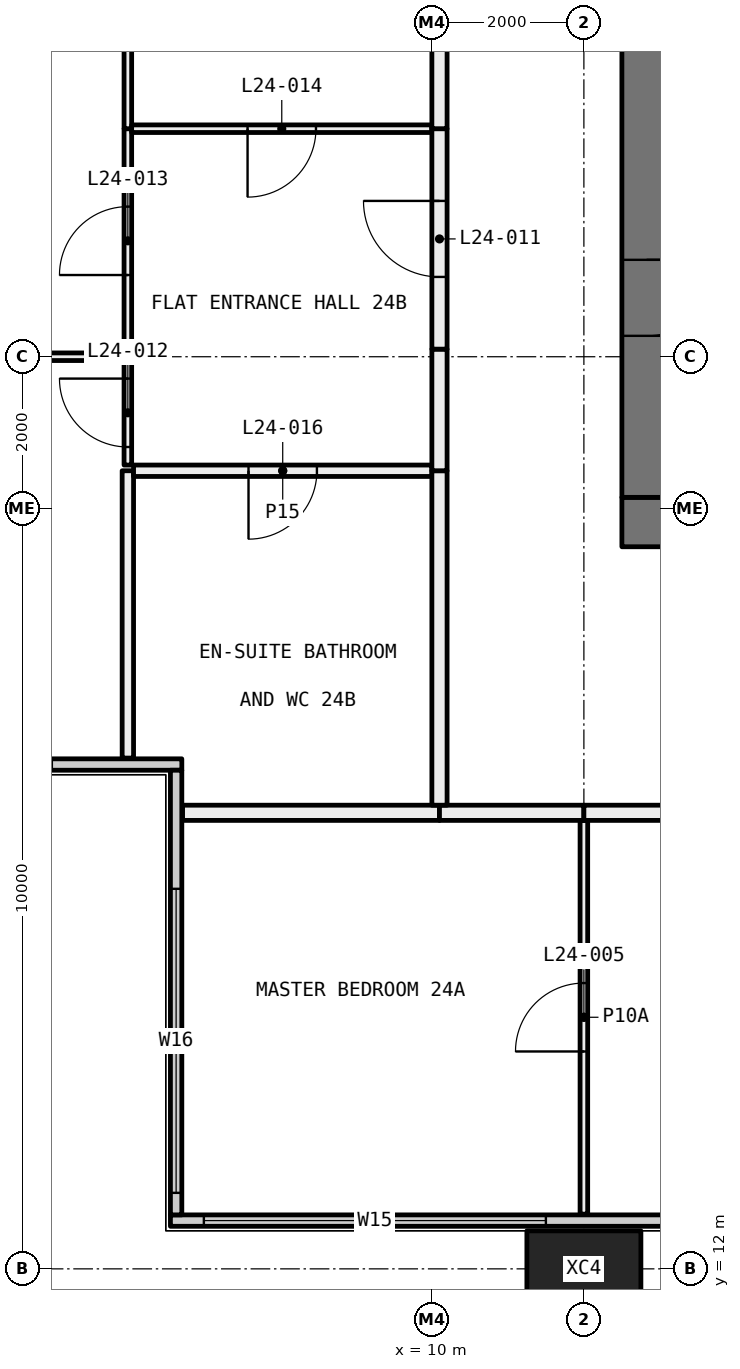
"""IFC4 building model, lengths in metres.
Left out: names, types, materials, properties, quantities, classifications, styles, units other than length and angle.
Written with IfcOpenShell. Run it as: python <this file> out.ifc"""

import sys

from ifc_helpers import new_model, si_unit, direction, frame, frame_2d, origin, origin_2d, place, context, subcontext, project, spatial, rectangle, hollow_rectangle, extrude, element, fill, save


model = new_model("IFC4")
c1 = context("Model", 3, precision=1e-05, world=origin(), true_north=direction((0.0, 1.0)))
c2 = subcontext(c1, "Body", "Model", "MODEL_VIEW")
j1 = project(units=[si_unit("LENGTHUNIT", "METRE"), si_unit("PLANEANGLEUNIT", "RADIAN")], contexts=[c1])
p1 = place(None, origin())
s1 = spatial("IfcSite", under=j1, at=p1, CompositionType="ELEMENT")
p2 = place(p1, origin())
s2 = spatial("IfcBuilding", under=s1, at=p2, CompositionType="ELEMENT")
p3 = place(p2, frame((0.0, 0.0, 96.6)))
s3 = spatial("IfcBuildingStorey", under=s2, at=p3, CompositionType="ELEMENT", Elevation=96.6)
p4 = place(p3, frame((12.0, 12.0, -0.4), z_axis=(0.0, 0.0, 1.0), x_axis=(1.0, 0.0, 0.0)))
e1 = element("IfcColumn", 1, at=p4, inside=s3, PredefinedType="COLUMN", context=c2, shape_type="SweptSolid", body=[
    extrude(hollow_rectangle(XDim=1.5, YDim=1.0, WallThickness=0.06, at=origin_2d()), origin(), (0.0, 0.0, 1.0), 3.45),
])
p5 = place(p3, frame((6.56, 12.635, 0.0), z_axis=(0.0, 0.0, 1.0), x_axis=(1.0, 0.0, 0.0)))
e2 = element("IfcWall", 2, at=p5, inside=s3, PredefinedType="ELEMENTEDWALL", context=c2, shape_type="SweptSolid", body=[
    extrude(rectangle(XDim=58.88, YDim=0.15, at=frame_2d((29.44, 0.0))), origin(), (0.0, 0.0, 1.0), 3.05),
])
p6 = place(p5, frame((0.44, 0.0, 0.45)))
e3 = element("IfcOpeningElement", 3, at=p6, cuts=e2, PredefinedType="OPENING", context=c2, shape_type="SweptSolid", body=[
    extrude(rectangle(XDim=4.5, YDim=2.55, at=frame_2d((2.25, 1.275))), frame((0.0, 0.085, 0.0), z_axis=(0.0, -1.0, 0.0), x_axis=(1.0, 0.0, 0.0)), (0.0, 0.0, 1.0), 0.17),
])
p7 = place(p5, frame((8.19, 0.0, 0.45)))
e4 = element("IfcOpeningElement", 4, at=p7, cuts=e2, PredefinedType="OPENING", context=c2, shape_type="SweptSolid", body=[
    extrude(rectangle(XDim=2.75, YDim=2.55, at=frame_2d((1.375, 1.275))), frame((0.0, 0.085, 0.0), z_axis=(0.0, -1.0, 0.0), x_axis=(1.0, 0.0, 0.0)), (0.0, 0.0, 1.0), 0.17),
])
p8 = place(p5, frame((11.94, 0.0, 0.45)))
e5 = element("IfcOpeningElement", 5, at=p8, cuts=e2, PredefinedType="OPENING", context=c2, shape_type="SweptSolid", body=[
    extrude(rectangle(XDim=2.75, YDim=2.55, at=frame_2d((1.375, 1.275))), frame((0.0, 0.085, 0.0), z_axis=(0.0, -1.0, 0.0), x_axis=(1.0, 0.0, 0.0)), (0.0, 0.0, 1.0), 0.17),
])
p9 = place(p5, frame((20.19, 0.0, 0.45)))
e6 = element("IfcOpeningElement", 6, at=p9, cuts=e2, PredefinedType="OPENING", context=c2, shape_type="SweptSolid", body=[
    extrude(rectangle(XDim=2.75, YDim=2.55, at=frame_2d((1.375, 1.275))), frame((0.0, 0.085, 0.0), z_axis=(0.0, -1.0, 0.0), x_axis=(1.0, 0.0, 0.0)), (0.0, 0.0, 1.0), 0.17),
])
p10 = place(p5, frame((23.94, 0.0, 0.45)))
e7 = element("IfcOpeningElement", 7, at=p10, cuts=e2, PredefinedType="OPENING", context=c2, shape_type="SweptSolid", body=[
    extrude(rectangle(XDim=2.0, YDim=2.55, at=frame_2d((1.0, 1.275))), frame((0.0, 0.085, 0.0), z_axis=(0.0, -1.0, 0.0), x_axis=(1.0, 0.0, 0.0)), (0.0, 0.0, 1.0), 0.17),
])
p11 = place(p5, frame((32.19, 0.0, 0.45)))
e8 = element("IfcOpeningElement", 8, at=p11, cuts=e2, PredefinedType="OPENING", context=c2, shape_type="SweptSolid", body=[
    extrude(rectangle(XDim=2.75, YDim=2.55, at=frame_2d((1.375, 1.275))), frame((0.0, 0.085, 0.0), z_axis=(0.0, -1.0, 0.0), x_axis=(1.0, 0.0, 0.0)), (0.0, 0.0, 1.0), 0.17),
])
p12 = place(p5, frame((35.94, 0.0, 0.45)))
e9 = element("IfcOpeningElement", 9, at=p12, cuts=e2, PredefinedType="OPENING", context=c2, shape_type="SweptSolid", body=[
    extrude(rectangle(XDim=2.75, YDim=2.55, at=frame_2d((1.375, 1.275))), frame((0.0, 0.085, 0.0), z_axis=(0.0, -1.0, 0.0), x_axis=(1.0, 0.0, 0.0)), (0.0, 0.0, 1.0), 0.17),
])
p13 = place(p5, frame((44.19, 0.0, 0.45)))
e10 = element("IfcOpeningElement", 10, at=p13, cuts=e2, PredefinedType="OPENING", context=c2, shape_type="SweptSolid", body=[
    extrude(rectangle(XDim=2.75, YDim=2.55, at=frame_2d((1.375, 1.275))), frame((0.0, 0.085, 0.0), z_axis=(0.0, -1.0, 0.0), x_axis=(1.0, 0.0, 0.0)), (0.0, 0.0, 1.0), 0.17),
])
p14 = place(p5, frame((47.94, 0.0, 0.45)))
e11 = element("IfcOpeningElement", 11, at=p14, cuts=e2, PredefinedType="OPENING", context=c2, shape_type="SweptSolid", body=[
    extrude(rectangle(XDim=2.0, YDim=2.55, at=frame_2d((1.0, 1.275))), frame((0.0, 0.085, 0.0), z_axis=(0.0, -1.0, 0.0), x_axis=(1.0, 0.0, 0.0)), (0.0, 0.0, 1.0), 0.17),
])
p15 = place(p5, frame((53.94, 0.0, 0.45)))
e12 = element("IfcOpeningElement", 12, at=p15, cuts=e2, PredefinedType="OPENING", context=c2, shape_type="SweptSolid", body=[
    extrude(rectangle(XDim=4.5, YDim=2.55, at=frame_2d((2.25, 1.275))), frame((0.0, 0.085, 0.0), z_axis=(0.0, -1.0, 0.0), x_axis=(1.0, 0.0, 0.0)), (0.0, 0.0, 1.0), 0.17),
])
p16 = place(p3, frame((0.56, 18.635, 0.0), z_axis=(0.0, 0.0, 1.0), x_axis=(1.0, 0.0, 0.0)))
e13 = element("IfcWall", 13, at=p16, inside=s3, PredefinedType="ELEMENTEDWALL", context=c2, shape_type="SweptSolid", body=[
    extrude(rectangle(XDim=6.15, YDim=0.15, at=frame_2d((3.075, 0.0))), origin(), (0.0, 0.0, 1.0), 3.05),
])
p17 = place(p16, frame((0.44, 0.0, 0.45)))
e14 = element("IfcOpeningElement", 14, at=p17, cuts=e13, PredefinedType="OPENING", context=c2, shape_type="SweptSolid", body=[
    extrude(rectangle(XDim=4.0, YDim=2.55, at=frame_2d((2.0, 1.275))), frame((0.0, 0.085, 0.0), z_axis=(0.0, -1.0, 0.0), x_axis=(1.0, 0.0, 0.0)), (0.0, 0.0, 1.0), 0.17),
])
p18 = place(p3, frame((6.635, 12.71, 0.0), z_axis=(0.0, 0.0, 1.0), x_axis=(0.0, 1.0, 0.0)))
e15 = element("IfcWall", 15, at=p18, inside=s3, PredefinedType="ELEMENTEDWALL", context=c2, shape_type="SweptSolid", body=[
    extrude(rectangle(XDim=5.85, YDim=0.15, at=frame_2d((2.925, 0.0))), origin(), (0.0, 0.0, 1.0), 3.05),
])
p19 = place(p18, frame((0.29, 0.0, 0.45)))
e16 = element("IfcOpeningElement", 16, at=p19, cuts=e15, PredefinedType="OPENING", context=c2, shape_type="SweptSolid", body=[
    extrude(rectangle(XDim=4.0, YDim=2.55, at=frame_2d((2.0, 1.275))), frame((0.0, 0.085, 0.0), z_axis=(0.0, -1.0, 0.0), x_axis=(1.0, 0.0, 0.0)), (0.0, 0.0, 1.0), 0.17),
])
p20 = place(p3, frame((12.0, 12.72, 0.0), z_axis=(0.0, 0.0, 1.0), x_axis=(0.0, 1.0, 0.0)))
e17 = element("IfcWall", 17, at=p20, inside=s3, PredefinedType="PARTITIONING", context=c2, shape_type="SweptSolid", body=[
    extrude(rectangle(XDim=5.18, YDim=0.1, at=frame_2d((2.59, 0.0))), origin(), (0.0, 0.0, 1.0), 3.05),
])
p21 = place(p20, frame((2.14, 0.0, 0.0)))
e18 = element("IfcOpeningElement", 18, at=p21, cuts=e17, PredefinedType="OPENING", context=c2, shape_type="SweptSolid", body=[
    extrude(rectangle(XDim=0.9, YDim=2.1, at=frame_2d((0.45, 1.05))), frame((0.0, 0.06, 0.0), z_axis=(0.0, -1.0, 0.0), x_axis=(1.0, 0.0, 0.0)), (0.0, 0.0, 1.0), 0.12),
])
p22 = place(p3, frame((10.1, 18.0, 0.0), z_axis=(0.0, 0.0, 1.0), x_axis=(-1.0, 0.0, 0.0)))
e19 = element("IfcWall", 19, at=p22, inside=s3, PredefinedType="PARTITIONING", context=c2, shape_type="SweptSolid", body=[
    extrude(rectangle(XDim=3.38, YDim=0.2, at=frame_2d((1.69, 0.0))), origin(), (0.0, 0.0, 1.0), 3.05),
])
p23 = place(p3, frame((12.0, 18.0, 0.0), z_axis=(0.0, 0.0, 1.0), x_axis=(-1.0, 0.0, 0.0)))
e20 = element("IfcWall", 20, at=p23, inside=s3, PredefinedType="PARTITIONING", context=c2, shape_type="SweptSolid", body=[
    extrude(rectangle(XDim=1.9, YDim=0.2, at=frame_2d((0.95, 0.0))), origin(), (0.0, 0.0, 1.0), 3.05),
])
p24 = place(p3, frame((18.0, 18.0, 0.0), z_axis=(0.0, 0.0, 1.0), x_axis=(-1.0, 0.0, 0.0)))
e21 = element("IfcWall", 21, at=p24, inside=s3, PredefinedType="PARTITIONING", context=c2, shape_type="SweptSolid", body=[
    extrude(rectangle(XDim=6.0, YDim=0.2, at=frame_2d((3.0, 0.0))), origin(), (0.0, 0.0, 1.0), 3.05),
])
p25 = place(p24, frame((2.5, 0.0, 0.0)))
e22 = element("IfcOpeningElement", 22, at=p25, cuts=e21, PredefinedType="OPENING", context=c2, shape_type="SweptSolid", body=[
    extrude(rectangle(XDim=1.0, YDim=2.1, at=frame_2d((0.5, 1.05))), frame((0.0, 0.11, 0.0), z_axis=(0.0, -1.0, 0.0), x_axis=(1.0, 0.0, 0.0)), (0.0, 0.0, 1.0), 0.22),
])
p26 = place(p3, frame((6.0, 24.0, 0.0), z_axis=(0.0, 0.0, 1.0), x_axis=(-1.0, 0.0, 0.0)))
e23 = element("IfcWall", 23, at=p26, inside=s3, PredefinedType="PARTITIONING", context=c2, shape_type="SweptSolid", body=[
    extrude(rectangle(XDim=5.28, YDim=0.1, at=frame_2d((2.64, 0.0))), origin(), (0.0, 0.0, 1.0), 2.45),
])
p27 = place(p3, frame((6.0, 18.72, 0.0), z_axis=(0.0, 0.0, 1.0), x_axis=(0.0, 1.0, 0.0)))
e24 = element("IfcWall", 24, at=p27, inside=s3, PredefinedType="PARTITIONING", context=c2, shape_type="SweptSolid", body=[
    extrude(rectangle(XDim=3.78, YDim=0.15, at=frame_2d((1.89, 0.0))), origin(), (0.0, 0.0, 1.0), 3.05),
])
p28 = place(p3, frame((6.0, 22.575, 0.0), z_axis=(0.0, 0.0, 1.0), x_axis=(0.0, 1.0, 0.0)))
e25 = element("IfcWall", 25, at=p28, inside=s3, PredefinedType="PARTITIONING", context=c2, shape_type="SweptSolid", body=[
    extrude(rectangle(XDim=1.375, YDim=0.1, at=frame_2d((0.688, 0.0))), origin(), (0.0, 0.0, 1.0), 2.45),
])
p29 = place(p28, frame((0.238, 0.0, 0.0)))
e26 = element("IfcOpeningElement", 26, at=p29, cuts=e25, PredefinedType="OPENING", context=c2, shape_type="SweptSolid", body=[
    extrude(rectangle(XDim=0.9, YDim=2.1, at=frame_2d((0.45, 1.05))), frame((0.0, 0.06, 0.0), z_axis=(0.0, -1.0, 0.0), x_axis=(1.0, 0.0, 0.0)), (0.0, 0.0, 1.0), 0.12),
])
p30 = place(p3, frame((6.0, 24.05, 0.0), z_axis=(0.0, 0.0, 1.0), x_axis=(0.0, 1.0, 0.0)))
e27 = element("IfcWall", 27, at=p30, inside=s3, PredefinedType="PARTITIONING", context=c2, shape_type="SweptSolid", body=[
    extrude(rectangle(XDim=2.95, YDim=0.1, at=frame_2d((1.475, 0.0))), origin(), (0.0, 0.0, 1.0), 2.45),
])
p31 = place(p30, frame((1.025, 0.0, 0.0)))
e28 = element("IfcOpeningElement", 28, at=p31, cuts=e27, PredefinedType="OPENING", context=c2, shape_type="SweptSolid", body=[
    extrude(rectangle(XDim=0.9, YDim=2.1, at=frame_2d((0.45, 1.05))), frame((0.0, 0.06, 0.0), z_axis=(0.0, -1.0, 0.0), x_axis=(1.0, 0.0, 0.0)), (0.0, 0.0, 1.0), 0.12),
])
p32 = place(p3, frame((6.0, 27.0, 0.0), z_axis=(0.0, 0.0, 1.0), x_axis=(0.0, 1.0, 0.0)))
e29 = element("IfcWall", 29, at=p32, inside=s3, PredefinedType="PARTITIONING", context=c2, shape_type="SweptSolid", body=[
    extrude(rectangle(XDim=2.95, YDim=0.1, at=frame_2d((1.475, 0.0))), origin(), (0.0, 0.0, 1.0), 3.05),
])
p33 = place(p3, frame((10.0, 22.5, 0.0), z_axis=(0.0, 0.0, 1.0), x_axis=(-1.0, 0.0, 0.0)))
e30 = element("IfcWall", 30, at=p33, inside=s3, PredefinedType="PARTITIONING", context=c2, shape_type="SweptSolid", body=[
    extrude(rectangle(XDim=3.925, YDim=0.15, at=frame_2d((1.962, 0.0))), origin(), (0.0, 0.0, 1.0), 3.05),
])
p34 = place(p33, frame((1.512, 0.0, 0.0)))
e31 = element("IfcOpeningElement", 31, at=p34, cuts=e30, PredefinedType="OPENING", context=c2, shape_type="SweptSolid", body=[
    extrude(rectangle(XDim=0.9, YDim=2.1, at=frame_2d((0.45, 1.05))), frame((0.0, 0.085, 0.0), z_axis=(0.0, -1.0, 0.0), x_axis=(1.0, 0.0, 0.0)), (0.0, 0.0, 1.0), 0.17),
])
p35 = place(p3, frame((10.1, 18.1, 0.0), z_axis=(0.0, 0.0, 1.0), x_axis=(0.0, 1.0, 0.0)))
e32 = element("IfcWall", 32, at=p35, inside=s3, PredefinedType="PARTITIONING", context=c2, shape_type="SweptSolid", body=[
    extrude(rectangle(XDim=4.4, YDim=0.2, at=frame_2d((2.2, 0.0))), origin(), (0.0, 0.0, 1.0), 3.05),
])
p36 = place(p3, frame((10.0, 27.0, 0.0), z_axis=(0.0, 0.0, 1.0), x_axis=(-1.0, 0.0, 0.0)))
e33 = element("IfcWall", 33, at=p36, inside=s3, PredefinedType="PARTITIONING", context=c2, shape_type="SweptSolid", body=[
    extrude(rectangle(XDim=3.95, YDim=0.1, at=frame_2d((1.975, 0.0))), origin(), (0.0, 0.0, 1.0), 3.05),
])
p37 = place(p36, frame((1.525, 0.0, 0.0)))
e34 = element("IfcOpeningElement", 34, at=p37, cuts=e33, PredefinedType="OPENING", context=c2, shape_type="SweptSolid", body=[
    extrude(rectangle(XDim=0.9, YDim=2.1, at=frame_2d((0.45, 1.05))), frame((0.0, 0.06, 0.0), z_axis=(0.0, -1.0, 0.0), x_axis=(1.0, 0.0, 0.0)), (0.0, 0.0, 1.0), 0.12),
])
p38 = place(p3, frame((10.1, 22.5, 0.0), z_axis=(0.0, 0.0, 1.0), x_axis=(0.0, 1.0, 0.0)))
e35 = element("IfcWall", 35, at=p38, inside=s3, PredefinedType="PARTITIONING", context=c2, shape_type="SweptSolid", body=[
    extrude(rectangle(XDim=1.6, YDim=0.2, at=frame_2d((0.8, 0.0))), origin(), (0.0, 0.0, 1.0), 2.45),
])
p39 = place(p3, frame((10.1, 24.1, 0.0), z_axis=(0.0, 0.0, 1.0), x_axis=(0.0, 1.0, 0.0)))
e36 = element("IfcWall", 36, at=p39, inside=s3, PredefinedType="PARTITIONING", context=c2, shape_type="SweptSolid", body=[
    extrude(rectangle(XDim=2.9, YDim=0.2, at=frame_2d((1.45, 0.0))), origin(), (0.0, 0.0, 1.0), 3.05),
])
p40 = place(p39, frame((0.95, 0.0, 0.0)))
e37 = element("IfcOpeningElement", 37, at=p40, cuts=e36, PredefinedType="OPENING", context=c2, shape_type="SweptSolid", body=[
    extrude(rectangle(XDim=1.0, YDim=2.1, at=frame_2d((0.5, 1.05))), frame((0.0, 0.11, 0.0), z_axis=(0.0, -1.0, 0.0), x_axis=(1.0, 0.0, 0.0)), (0.0, 0.0, 1.0), 0.22),
])
p41 = place(p3, frame((10.1, 27.0, 0.0), z_axis=(0.0, 0.0, 1.0), x_axis=(0.0, 1.0, 0.0)))
e38 = element("IfcWall", 38, at=p41, inside=s3, PredefinedType="PARTITIONING", context=c2, shape_type="SweptSolid", body=[
    extrude(rectangle(XDim=9.1, YDim=0.2, at=frame_2d((4.55, 0.0))), origin(), (0.0, 0.0, 1.0), 2.45),
])
p42 = place(p3, frame((12.5, 21.825, 0.0), z_axis=(0.0, 0.0, 1.0), x_axis=(1.0, 0.0, 0.0)))
e39 = element("IfcWall", 39, at=p42, inside=s3, PredefinedType="SHEAR", context=c2, shape_type="SweptSolid", body=[
    extrude(rectangle(XDim=11.0, YDim=0.65, at=frame_2d((5.5, 0.0))), origin(), (0.0, 0.0, 1.0), 3.05),
])
p43 = place(p3, frame((12.825, 22.15, 0.0), z_axis=(0.0, 0.0, 1.0), x_axis=(0.0, 1.0, 0.0)))
e40 = element("IfcWall", 40, at=p43, inside=s3, PredefinedType="SHEAR", context=c2, shape_type="SweptSolid", body=[
    extrude(rectangle(XDim=15.7, YDim=0.65, at=frame_2d((7.85, 0.0))), origin(), (0.0, 0.0, 1.0), 3.05),
])
p44 = place(p43, frame((8.3, 0.0, 0.0)))
e41 = element("IfcOpeningElement", 41, at=p44, cuts=e40, PredefinedType="OPENING", context=c2, shape_type="SweptSolid", body=[
    extrude(rectangle(XDim=1.6, YDim=2.1, at=frame_2d((0.8, 1.05))), frame((0.0, 0.335, 0.0), z_axis=(0.0, -1.0, 0.0), x_axis=(1.0, 0.0, 0.0)), (0.0, 0.0, 1.0), 0.67),
])
p45 = place(p43, frame((2.125, 0.0, 0.0)))
e42 = element("IfcOpeningElement", 42, at=p45, cuts=e40, PredefinedType="OPENING", context=c2, shape_type="SweptSolid", body=[
    extrude(rectangle(XDim=1.0, YDim=2.1, at=frame_2d((0.5, 1.05))), frame((0.0, 0.335, 0.0), z_axis=(0.0, -1.0, 0.0), x_axis=(1.0, 0.0, 0.0)), (0.0, 0.0, 1.0), 0.67),
])
p46 = place(p6, origin())
e43 = element("IfcWindow", 43, at=p46, inside=s3, PartitioningType="SINGLE_PANEL", PredefinedType="WINDOW", context=c2, shape_type="SweptSolid", body=[
    extrude(rectangle(XDim=4.5, YDim=2.55, at=frame_2d((2.25, 1.275))), frame((0.0, 0.03, 0.0), z_axis=(0.0, -1.0, 0.0), x_axis=(1.0, 0.0, 0.0)), (0.0, 0.0, 1.0), 0.06),
])
fill(e3, e43)
p47 = place(p19, origin())
e44 = element("IfcWindow", 44, at=p47, inside=s3, PartitioningType="SINGLE_PANEL", PredefinedType="WINDOW", context=c2, shape_type="SweptSolid", body=[
    extrude(rectangle(XDim=4.0, YDim=2.55, at=frame_2d((2.0, 1.275))), frame((0.0, 0.03, 0.0), z_axis=(0.0, -1.0, 0.0), x_axis=(1.0, 0.0, 0.0)), (0.0, 0.0, 1.0), 0.06),
])
fill(e16, e44)
p48 = place(p21, origin())
e45 = element("IfcDoor", 45, at=p48, inside=s3, OperationType="SINGLE_SWING_RIGHT", PredefinedType="DOOR", context=c2, shape_type="SweptSolid", body=[
    extrude(rectangle(XDim=0.9, YDim=2.1, at=frame_2d((0.45, 1.05))), frame((0.0, 0.025, 0.0), z_axis=(0.0, -1.0, 0.0), x_axis=(1.0, 0.0, 0.0)), (0.0, 0.0, 1.0), 0.05),
])
fill(e18, e45)
p49 = place(p40, origin())
e46 = element("IfcDoor", 46, at=p49, inside=s3, OperationType="SINGLE_SWING_LEFT", PredefinedType="DOOR", context=c2, shape_type="SweptSolid", body=[
    extrude(rectangle(XDim=1.0, YDim=2.1, at=frame_2d((0.5, 1.05))), frame((0.0, 0.025, 0.0), z_axis=(0.0, -1.0, 0.0), x_axis=(1.0, 0.0, 0.0)), (0.0, 0.0, 1.0), 0.05),
])
fill(e37, e46)
p50 = place(p29, origin())
e47 = element("IfcDoor", 47, at=p50, inside=s3, OperationType="SINGLE_SWING_LEFT", PredefinedType="DOOR", context=c2, shape_type="SweptSolid", body=[
    extrude(rectangle(XDim=0.9, YDim=2.1, at=frame_2d((0.45, 1.05))), frame((0.0, 0.025, 0.0), z_axis=(0.0, -1.0, 0.0), x_axis=(1.0, 0.0, 0.0)), (0.0, 0.0, 1.0), 0.05),
])
fill(e26, e47)
p51 = place(p31, origin())
e48 = element("IfcDoor", 48, at=p51, inside=s3, OperationType="SINGLE_SWING_RIGHT", PredefinedType="DOOR", context=c2, shape_type="SweptSolid", body=[
    extrude(rectangle(XDim=0.9, YDim=2.1, at=frame_2d((0.45, 1.05))), frame((0.0, 0.025, 0.0), z_axis=(0.0, -1.0, 0.0), x_axis=(1.0, 0.0, 0.0)), (0.0, 0.0, 1.0), 0.05),
])
fill(e28, e48)
p52 = place(p37, origin())
e49 = element("IfcDoor", 49, at=p52, inside=s3, OperationType="SINGLE_SWING_LEFT", PredefinedType="DOOR", context=c2, shape_type="SweptSolid", body=[
    extrude(rectangle(XDim=0.9, YDim=2.1, at=frame_2d((0.45, 1.05))), frame((0.0, 0.025, 0.0), z_axis=(0.0, -1.0, 0.0), x_axis=(1.0, 0.0, 0.0)), (0.0, 0.0, 1.0), 0.05),
])
fill(e34, e49)
p53 = place(p34, origin())
e50 = element("IfcDoor", 50, at=p53, inside=s3, OperationType="SINGLE_SWING_LEFT", PredefinedType="DOOR", context=c2, shape_type="SweptSolid", body=[
    extrude(rectangle(XDim=0.9, YDim=2.1, at=frame_2d((0.45, 1.05))), frame((0.0, 0.025, 0.0), z_axis=(0.0, -1.0, 0.0), x_axis=(1.0, 0.0, 0.0)), (0.0, 0.0, 1.0), 0.05),
])
fill(e31, e50)
p54 = place(p45, frame((1.0, 0.0, 0.0), x_axis=(-1.0, 0.0, 0.0)))
e51 = element("IfcDoor", 51, at=p54, inside=s3, OperationType="SINGLE_SWING_RIGHT", PredefinedType="DOOR", context=c2, shape_type="SweptSolid", body=[
    extrude(rectangle(XDim=1.0, YDim=2.1, at=frame_2d((0.5, 1.05))), frame((0.0, 0.025, 0.0), z_axis=(0.0, -1.0, 0.0), x_axis=(1.0, 0.0, 0.0)), (0.0, 0.0, 1.0), 0.05),
])
fill(e42, e51)
save(model, sys.argv[1])
